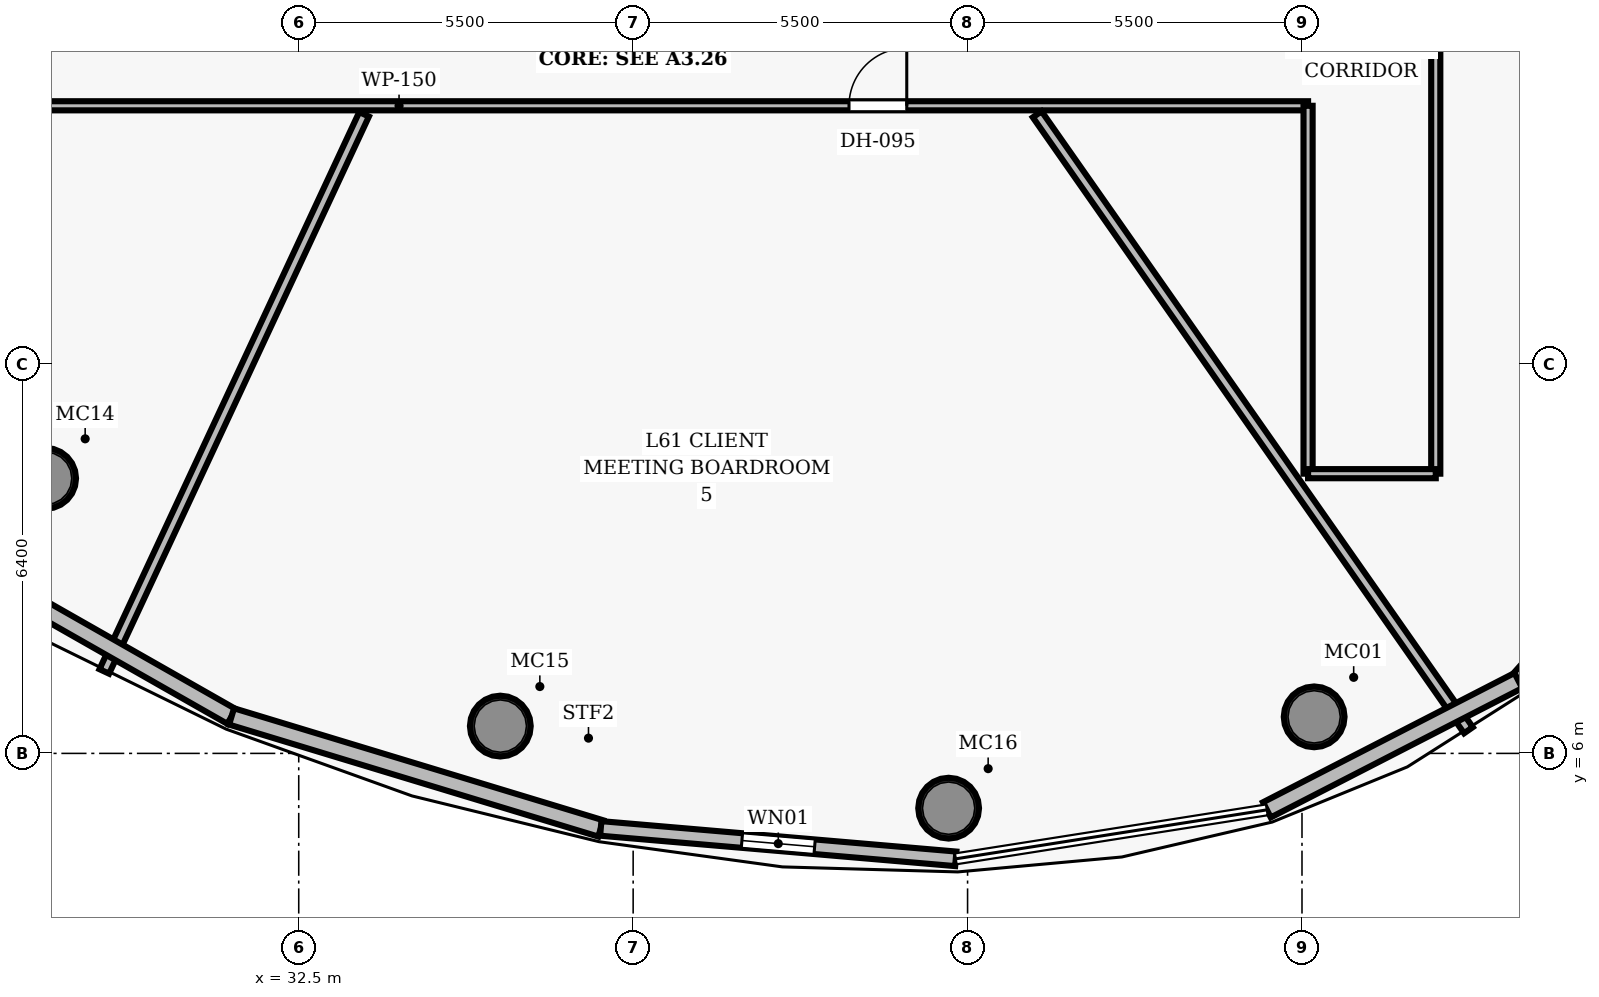
"""IFC4 building model, lengths in metres.
Left out: names, types, materials, properties, quantities, classifications, styles, units other than length and angle.
Written with IfcOpenShell. Run it as: python <this file> out.ifc"""

import sys

from ifc_helpers import new_model, si_unit, direction, frame, frame_2d, origin, origin_2d, place, context, subcontext, project, spatial, rectangle, hollow_circle, extrude, element, fill, save


model = new_model("IFC4")
c1 = context("Model", 3, precision=1e-05, world=origin(), true_north=direction((0.0, 1.0)))
c2 = subcontext(c1, "Body", "Model", "MODEL_VIEW")
j1 = project(units=[si_unit("LENGTHUNIT", "METRE"), si_unit("PLANEANGLEUNIT", "RADIAN")], contexts=[c1])
p1 = place(None, origin())
s1 = spatial("IfcSite", under=j1, at=p1, CompositionType="ELEMENT")
p2 = place(p1, origin())
s2 = spatial("IfcBuilding", under=s1, at=p2, CompositionType="ELEMENT")
p3 = place(p2, frame((0.0, 0.0, 242.05)))
s3 = spatial("IfcBuildingStorey", under=s2, at=p3, CompositionType="ELEMENT", Elevation=242.05)
for number, where, z_axis, x_axis in (
    (1, (49.2, 6.601, 0.0), (0.0, 0.0, 1.0), (1.0, 0.0, 0.0)),
    (2, (28.338, 10.523, 0.0), (0.0, 0.0, 1.0), (1.0, 0.0, 0.0)),
    (3, (35.815, 6.449, 0.0), (0.0, 0.0, 1.0), (1.0, 0.0, 0.0)),
    (4, (43.188, 5.099, 0.0), (0.0, 0.0, 1.0), (1.0, 0.0, 0.0)),
):
    element("IfcColumn", number, at=place(p3, frame(where, z_axis=z_axis, x_axis=x_axis)), inside=s3, PredefinedType="COLUMN", context=c2, shape_type="SweptSolid", body=[
        extrude(hollow_circle(Radius=0.5, WallThickness=0.045, at=origin_2d()), origin(), (0.0, 0.0, 1.0), 3.85),
    ])
p4 = place(p3, frame((26.9, 16.65, 0.0), z_axis=(0.0, 0.0, 1.0), x_axis=(1.0, 0.0, 0.0)))
e5 = element("IfcWall", 5, at=p4, inside=s3, PredefinedType="PARTITIONING", context=c2, shape_type="SweptSolid", body=[
    extrude(rectangle(XDim=22.2, YDim=0.15, at=frame_2d((11.1, 0.0))), origin(), (0.0, 0.0, 1.0), 3.04),
])
p5 = place(p4, frame((14.65, 0.0, 0.0)))
e6 = element("IfcOpeningElement", 6, at=p5, cuts=e5, PredefinedType="OPENING", context=c2, shape_type="SweptSolid", body=[
    extrude(rectangle(XDim=0.95, YDim=2.15, at=frame_2d((0.475, 1.075))), frame((0.0, 0.085, 0.0), z_axis=(0.0, -1.0, 0.0), x_axis=(1.0, 0.0, 0.0)), (0.0, 0.0, 1.0), 0.17),
])
p6 = place(p3, frame((51.2, 10.6, 0.0), z_axis=(0.0, 0.0, 1.0), x_axis=(0.0, 1.0, 0.0)))
e7 = element("IfcWall", 7, at=p6, inside=s3, PredefinedType="PARTITIONING", context=c2, shape_type="SweptSolid", body=[
    extrude(rectangle(XDim=30.79, YDim=0.15, at=frame_2d((15.395, 0.0))), origin(), (0.0, 0.0, 1.0), 3.04),
])
p7 = place(p6, frame((19.149, 0.0, 0.0)))
e8 = element("IfcOpeningElement", 8, at=p7, cuts=e7, PredefinedType="OPENING", context=c2, shape_type="SweptSolid", body=[
    extrude(rectangle(XDim=1.5, YDim=2.2, at=frame_2d((0.75, 1.1))), frame((0.0, 0.085, 0.0), z_axis=(0.0, -1.0, 0.0), x_axis=(1.0, 0.0, 0.0)), (0.0, 0.0, 1.0), 0.17),
])
p8 = place(p6, frame((12.171, 0.0, 0.0)))
e9 = element("IfcOpeningElement", 9, at=p8, cuts=e7, PredefinedType="OPENING", context=c2, shape_type="SweptSolid", body=[
    extrude(rectangle(XDim=0.95, YDim=2.15, at=frame_2d((0.475, 1.075))), frame((0.0, 0.085, 0.0), z_axis=(0.0, -1.0, 0.0), x_axis=(1.0, 0.0, 0.0)), (0.0, 0.0, 1.0), 0.17),
])
p9 = place(p3, frame((49.1, 10.6, 0.0), z_axis=(0.0, 0.0, 1.0), x_axis=(0.0, 1.0, 0.0)))
e10 = element("IfcWall", 10, at=p9, inside=s3, PredefinedType="PARTITIONING", context=c2, shape_type="SweptSolid", body=[
    extrude(rectangle(XDim=6.05, YDim=0.15, at=frame_2d((3.025, 0.0))), origin(), (0.0, 0.0, 1.0), 3.04),
])
p10 = place(p3, frame((49.1, 10.6, 0.0), z_axis=(0.0, 0.0, 1.0), x_axis=(1.0, 0.0, 0.0)))
e11 = element("IfcWall", 11, at=p10, inside=s3, PredefinedType="PARTITIONING", context=c2, shape_type="SweptSolid", body=[
    extrude(rectangle(XDim=2.1, YDim=0.15, at=frame_2d((1.05, 0.0))), origin(), (0.0, 0.0, 1.0), 3.04),
])
p11 = place(p3, frame((33.575, 16.51, 0.0), z_axis=(0.0, 0.0, 1.0), x_axis=(-0.422617069522, -0.906308342976, 0.0)))
e12 = element("IfcWall", 12, at=p11, inside=s3, PredefinedType="PARTITIONING", context=c2, shape_type="SweptSolid", body=[
    extrude(rectangle(XDim=10.11, YDim=0.175, at=frame_2d((5.055, 0.0))), origin(), (0.0, 0.0, 1.0), 3.04),
])
p12 = place(p3, frame((44.645, 16.51, 0.0), z_axis=(0.0, 0.0, 1.0), x_axis=(0.573564372876, -0.819160491093, 0.0)))
e13 = element("IfcWall", 13, at=p12, inside=s3, PredefinedType="PARTITIONING", context=c2, shape_type="SweptSolid", body=[
    extrude(rectangle(XDim=12.365, YDim=0.175, at=frame_2d((6.183, 0.0))), origin(), (0.0, 0.0, 1.0), 3.04),
])
p13 = place(p3, frame((55.653, 10.669, 0.0), z_axis=(0.0, 0.0, 1.0), x_axis=(-0.665305013969, -0.746571656566, 0.0)))
e14 = element("IfcWall", 14, at=p13, inside=s3, PredefinedType="SOLIDWALL", context=c2, shape_type="SweptSolid", body=[
    extrude(rectangle(XDim=4.65, YDim=0.28, at=frame_2d((2.325, 0.0))), origin(), (0.0, 0.0, 1.0), 3.625),
])
p14 = place(p3, frame((31.396, 6.607, 0.0), z_axis=(0.0, 0.0, 1.0), x_axis=(-0.869128067122, 0.494587103492, 0.0)))
e15 = element("IfcWall", 15, at=p14, inside=s3, PredefinedType="SOLIDWALL", context=c2, shape_type="SweptSolid", body=[
    extrude(rectangle(XDim=6.526, YDim=0.28, at=frame_2d((3.263, 0.0))), origin(), (0.0, 0.0, 1.0), 3.625),
])
p15 = place(p3, frame((37.468, 4.766, 0.0), z_axis=(0.0, 0.0, 1.0), x_axis=(-0.956967430601, 0.290195342431, 0.0)))
e16 = element("IfcWall", 16, at=p15, inside=s3, PredefinedType="SOLIDWALL", context=c2, shape_type="SweptSolid", body=[
    extrude(rectangle(XDim=6.345, YDim=0.28, at=frame_2d((3.172, 0.0))), origin(), (0.0, 0.0, 1.0), 3.625),
])
p16 = place(p3, frame((43.306, 4.266, 0.0), z_axis=(0.0, 0.0, 1.0), x_axis=(-0.996353229665, 0.085324332609, 0.0)))
e17 = element("IfcWall", 17, at=p16, inside=s3, PredefinedType="SOLIDWALL", context=c2, shape_type="SweptSolid", body=[
    extrude(rectangle(XDim=5.86, YDim=0.24, at=frame_2d((2.93, 0.0))), origin(), (0.0, 0.0, 1.0), 3.625),
])
p17 = place(p16, frame((2.33, 0.0, 0.85)))
e18 = element("IfcOpeningElement", 18, at=p17, cuts=e17, PredefinedType="OPENING", context=c2, shape_type="SweptSolid", body=[
    extrude(rectangle(XDim=1.2, YDim=1.6, at=frame_2d((0.6, 0.8))), frame((0.0, 0.13, 0.0), z_axis=(0.0, -1.0, 0.0), x_axis=(1.0, 0.0, 0.0)), (0.0, 0.0, 1.0), 0.26),
])
p18 = place(p3, frame((52.559, 7.198, 0.0), z_axis=(0.0, 0.0, 1.0), x_axis=(-0.889373798751, -0.457180758666, 0.0)))
e19 = element("IfcWall", 19, at=p18, inside=s3, PredefinedType="SOLIDWALL", context=c2, shape_type="SweptSolid", body=[
    extrude(rectangle(XDim=4.651, YDim=0.28, at=frame_2d((2.325, 0.0))), origin(), (0.0, 0.0, 1.0), 3.625),
])
p19 = place(p5, origin())
e20 = element("IfcDoor", 20, at=p19, inside=s3, OperationType="SINGLE_SWING_RIGHT", PredefinedType="DOOR", context=c2, shape_type="SweptSolid", body=[
    extrude(rectangle(XDim=0.95, YDim=2.15, at=frame_2d((0.475, 1.075))), frame((0.0, 0.025, 0.0), z_axis=(0.0, -1.0, 0.0), x_axis=(1.0, 0.0, 0.0)), (0.0, 0.0, 1.0), 0.05),
])
fill(e6, e20)
p20 = place(p17, origin())
e21 = element("IfcWindow", 21, at=p20, inside=s3, PartitioningType="SINGLE_PANEL", PredefinedType="WINDOW", context=c2, shape_type="SweptSolid", body=[
    extrude(rectangle(XDim=1.2, YDim=1.6, at=frame_2d((0.6, 0.8))), frame((0.0, 0.03, 0.0), z_axis=(0.0, -1.0, 0.0), x_axis=(1.0, 0.0, 0.0)), (0.0, 0.0, 1.0), 0.06),
])
fill(e18, e21)
save(model, sys.argv[1])
